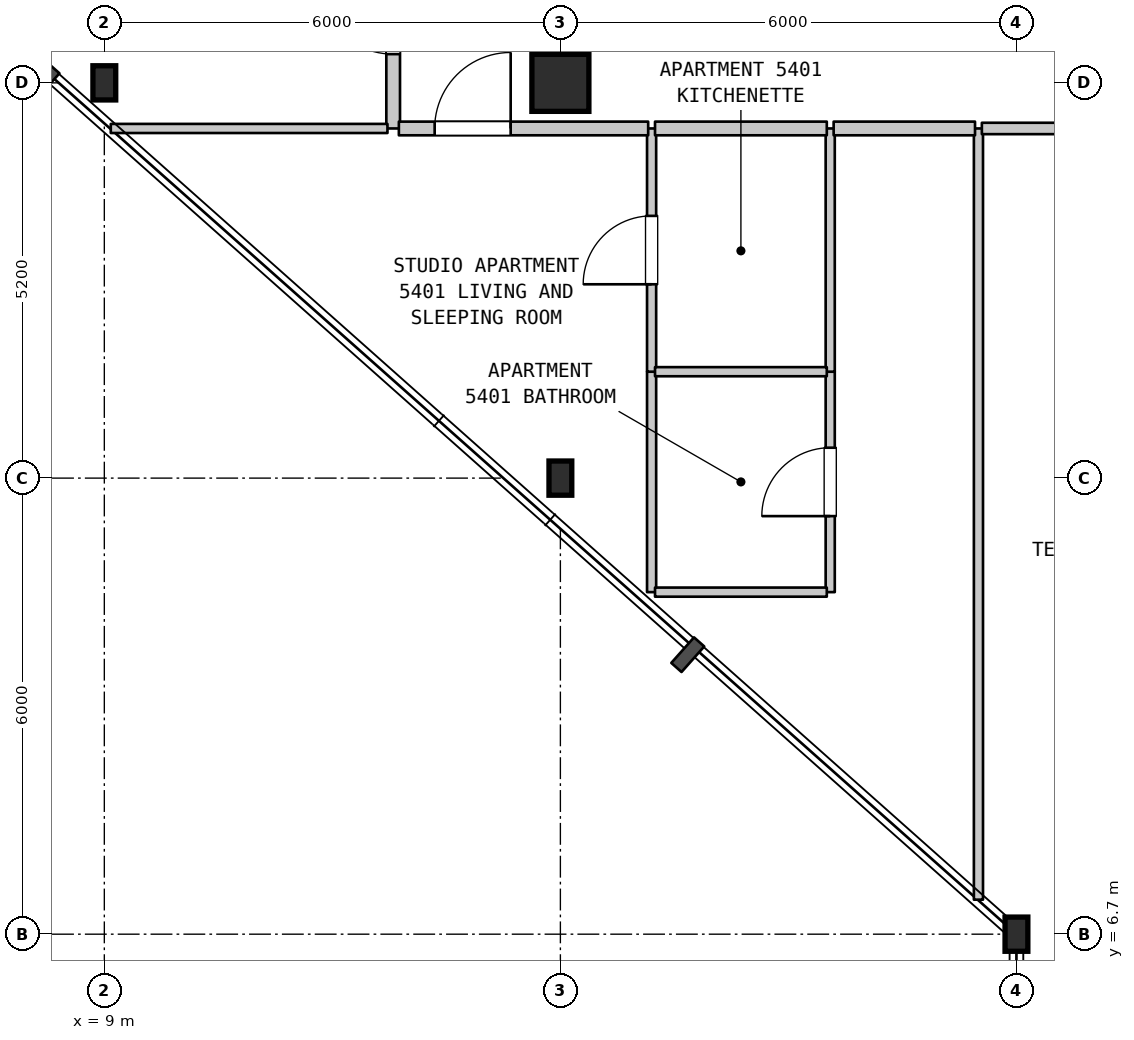
"""IFC4 building model, lengths in metres.
Left out: names, types, materials, properties, quantities, classifications, styles, units other than length and angle.
Written with IfcOpenShell. Run it as: python <this file> out.ifc"""

import sys

from ifc_helpers import new_model, si_unit, direction, frame, frame_2d, origin, origin_2d, place, context, subcontext, project, spatial, rectangle, i_section, extrude, element, fill, save


model = new_model("IFC4")
c1 = context("Model", 3, precision=1e-05, world=origin(), true_north=direction((0.0, 1.0)))
c2 = subcontext(c1, "Body", "Model", "MODEL_VIEW")
j1 = project(units=[si_unit("LENGTHUNIT", "METRE"), si_unit("PLANEANGLEUNIT", "RADIAN")], contexts=[c1])
p1 = place(None, origin())
s1 = spatial("IfcSite", under=j1, at=p1, CompositionType="ELEMENT")
p2 = place(p1, origin())
s2 = spatial("IfcBuilding", under=s1, at=p2, CompositionType="ELEMENT")
p3 = place(p2, frame((0.0, 0.0, 218.0)))
s3 = spatial("IfcBuildingStorey", under=s2, at=p3, CompositionType="ELEMENT", Elevation=218.0)
for number, where, z_axis, x_axis in (
    (1, (9.0, 17.9, 0.0), (0.0, 0.0, 1.0), (1.0, 0.0, 0.0)),
    (2, (15.0, 12.7, 0.0), (0.0, 0.0, 1.0), (1.0, 0.0, 0.0)),
):
    element("IfcColumn", number, at=place(p3, frame(where, z_axis=z_axis, x_axis=x_axis)), inside=s3, PredefinedType="COLUMN", context=c2, shape_type="SweptSolid", body=[
        extrude(i_section(OverallWidth=0.3, OverallDepth=0.45, WebThickness=0.014, FlangeThickness=0.026, FilletRadius=0.027, at=origin_2d()), origin(), (0.0, 0.0, 1.0), 4.8),
    ])
p4 = place(p3, frame((15.0, 17.9, 0.0), z_axis=(0.0, 0.0, 1.0), x_axis=(1.0, 0.0, 0.0)))
e3 = element("IfcColumn", 3, at=p4, inside=s3, PredefinedType="COLUMN", context=c2, shape_type="SweptSolid", body=[
    extrude(rectangle(XDim=0.75, YDim=0.75, at=origin_2d()), origin(), (0.0, 0.0, 1.0), 4.8),
])
p5 = place(p3, frame((21.0, 6.7, 0.0), z_axis=(0.0, 0.0, 1.0), x_axis=(1.0, 0.0, 0.0)))
e4 = element("IfcColumn", 4, at=p5, inside=s3, PredefinedType="COLUMN", context=c2, shape_type="SweptSolid", body=[
    extrude(i_section(OverallWidth=0.3, OverallDepth=0.45, WebThickness=0.014, FlangeThickness=0.026, FilletRadius=0.027, at=origin_2d()), origin(), (0.0, 0.0, 1.0), 4.8),
])
p6 = place(p3, frame((12.8, 17.3, 0.0), z_axis=(0.0, 0.0, 1.0), x_axis=(0.0, 1.0, 0.0)))
e5 = element("IfcWall", 5, at=p6, inside=s3, PredefinedType="STANDARD", context=c2, shape_type="SweptSolid", body=[
    extrude(rectangle(XDim=3.1, YDim=0.18, at=frame_2d((1.55, 0.0))), origin(), (0.0, 0.0, 1.0), 4.49),
])
p7 = place(p6, frame((0.978, 0.0, 0.0)))
e6 = element("IfcOpeningElement", 6, at=p7, cuts=e5, PredefinedType="OPENING", context=c2, shape_type="SweptSolid", body=[
    extrude(rectangle(XDim=1.0, YDim=2.15, at=frame_2d((0.5, 1.075))), frame((0.0, 0.1, 0.0), z_axis=(0.0, -1.0, 0.0), x_axis=(1.0, 0.0, 0.0)), (0.0, 0.0, 1.0), 0.2),
])
p8 = place(p3, frame((16.2, 11.2, 0.0), z_axis=(0.0, 0.0, 1.0), x_axis=(0.0, 1.0, 0.0)))
e7 = element("IfcWall", 7, at=p8, inside=s3, PredefinedType="PARTITIONING", context=c2, shape_type="SweptSolid", body=[
    extrude(rectangle(XDim=2.9, YDim=0.12, at=frame_2d((1.45, 0.0))), origin(), (0.0, 0.0, 1.0), 4.49),
])
p9 = place(p3, frame((16.2, 14.1, 0.0), z_axis=(0.0, 0.0, 1.0), x_axis=(0.0, 1.0, 0.0)))
e8 = element("IfcWall", 8, at=p9, inside=s3, PredefinedType="PARTITIONING", context=c2, shape_type="SweptSolid", body=[
    extrude(rectangle(XDim=3.2, YDim=0.12, at=frame_2d((1.6, 0.0))), origin(), (0.0, 0.0, 1.0), 4.49),
])
p10 = place(p9, frame((1.15, 0.0, 0.0)))
e9 = element("IfcOpeningElement", 9, at=p10, cuts=e8, PredefinedType="OPENING", context=c2, shape_type="SweptSolid", body=[
    extrude(rectangle(XDim=0.9, YDim=2.15, at=frame_2d((0.45, 1.075))), frame((0.0, 0.07, 0.0), z_axis=(0.0, -1.0, 0.0), x_axis=(1.0, 0.0, 0.0)), (0.0, 0.0, 1.0), 0.14),
])
p11 = place(p3, frame((18.55, 11.2, 0.0), z_axis=(0.0, 0.0, 1.0), x_axis=(0.0, 1.0, 0.0)))
e10 = element("IfcWall", 10, at=p11, inside=s3, PredefinedType="PARTITIONING", context=c2, shape_type="SweptSolid", body=[
    extrude(rectangle(XDim=2.9, YDim=0.12, at=frame_2d((1.45, 0.0))), origin(), (0.0, 0.0, 1.0), 4.49),
])
p12 = place(p11, frame((1.0, 0.0, 0.0)))
e11 = element("IfcOpeningElement", 11, at=p12, cuts=e10, PredefinedType="OPENING", context=c2, shape_type="SweptSolid", body=[
    extrude(rectangle(XDim=0.9, YDim=2.1, at=frame_2d((0.45, 1.05))), frame((0.0, 0.07, 0.0), z_axis=(0.0, -1.0, 0.0), x_axis=(1.0, 0.0, 0.0)), (0.0, 0.0, 1.0), 0.14),
])
p13 = place(p3, frame((18.55, 14.1, 0.0), z_axis=(0.0, 0.0, 1.0), x_axis=(0.0, 1.0, 0.0)))
e12 = element("IfcWall", 12, at=p13, inside=s3, PredefinedType="PARTITIONING", context=c2, shape_type="SweptSolid", body=[
    extrude(rectangle(XDim=3.2, YDim=0.12, at=frame_2d((1.6, 0.0))), origin(), (0.0, 0.0, 1.0), 4.49),
])
p14 = place(p3, frame((20.5, 7.154, 0.0), z_axis=(0.0, 0.0, 1.0), x_axis=(0.0, 1.0, 0.0)))
e13 = element("IfcWall", 13, at=p14, inside=s3, PredefinedType="PARTITIONING", context=c2, shape_type="SweptSolid", body=[
    extrude(rectangle(XDim=10.146, YDim=0.12, at=frame_2d((5.073, 0.0))), origin(), (0.0, 0.0, 1.0), 4.49),
])
for number, where, z_axis, x_axis in (
    (14, (16.245, 11.2, 0.0), (0.0, 0.0, 1.0), (1.0, 0.0, 0.0)),
    (15, (16.245, 14.1, 0.0), (0.0, 0.0, 1.0), (1.0, 0.0, 0.0)),
):
    element("IfcWall", number, at=place(p3, frame(where, z_axis=z_axis, x_axis=x_axis)), inside=s3, PredefinedType="PARTITIONING", context=c2, shape_type="SweptSolid", body=[
        extrude(rectangle(XDim=2.26, YDim=0.12, at=frame_2d((1.13, 0.0))), origin(), (0.0, 0.0, 1.0), 4.49),
    ])
p15 = place(p3, frame((9.085, 17.3, 0.0), z_axis=(0.0, 0.0, 1.0), x_axis=(1.0, 0.0, 0.0)))
e16 = element("IfcWall", 16, at=p15, inside=s3, PredefinedType="PARTITIONING", context=c2, shape_type="SweptSolid", body=[
    extrude(rectangle(XDim=3.64, YDim=0.12, at=frame_2d((1.82, 0.0))), origin(), (0.0, 0.0, 1.0), 4.49),
])
p16 = place(p3, frame((12.875, 17.3, 0.0), z_axis=(0.0, 0.0, 1.0), x_axis=(1.0, 0.0, 0.0)))
e17 = element("IfcWall", 17, at=p16, inside=s3, PredefinedType="STANDARD", context=c2, shape_type="SweptSolid", body=[
    extrude(rectangle(XDim=3.28, YDim=0.18, at=frame_2d((1.64, 0.0))), origin(), (0.0, 0.0, 1.0), 4.49),
])
p17 = place(p16, frame((0.471, 0.0, 0.0)))
e18 = element("IfcOpeningElement", 18, at=p17, cuts=e17, PredefinedType="OPENING", context=c2, shape_type="SweptSolid", body=[
    extrude(rectangle(XDim=1.0, YDim=2.15, at=frame_2d((0.5, 1.075))), frame((0.0, 0.1, 0.0), z_axis=(0.0, -1.0, 0.0), x_axis=(1.0, 0.0, 0.0)), (0.0, 0.0, 1.0), 0.2),
])
p18 = place(p3, frame((16.245, 17.3, 0.0), z_axis=(0.0, 0.0, 1.0), x_axis=(1.0, 0.0, 0.0)))
e19 = element("IfcWall", 19, at=p18, inside=s3, PredefinedType="STANDARD", context=c2, shape_type="SweptSolid", body=[
    extrude(rectangle(XDim=2.26, YDim=0.18, at=frame_2d((1.13, 0.0))), origin(), (0.0, 0.0, 1.0), 4.49),
])
p19 = place(p3, frame((18.595, 17.3, 0.0), z_axis=(0.0, 0.0, 1.0), x_axis=(1.0, 0.0, 0.0)))
e20 = element("IfcWall", 20, at=p19, inside=s3, PredefinedType="STANDARD", context=c2, shape_type="SweptSolid", body=[
    extrude(rectangle(XDim=1.86, YDim=0.18, at=frame_2d((0.93, 0.0))), origin(), (0.0, 0.0, 1.0), 4.49),
])
p20 = place(p3, frame((20.545, 17.3, 0.0), z_axis=(0.0, 0.0, 1.0), x_axis=(1.0, 0.0, 0.0)))
e21 = element("IfcWall", 21, at=p20, inside=s3, PredefinedType="STANDARD", context=c2, shape_type="SweptSolid", body=[
    extrude(rectangle(XDim=3.61, YDim=0.15, at=frame_2d((1.805, 0.0))), origin(), (0.0, 0.0, 1.0), 4.49),
])
p21 = place(p20, frame((1.305, 0.0, 0.0)))
e22 = element("IfcOpeningElement", 22, at=p21, cuts=e21, PredefinedType="OPENING", context=c2, shape_type="SweptSolid", body=[
    extrude(rectangle(XDim=1.0, YDim=2.15, at=frame_2d((0.5, 1.075))), frame((0.0, 0.085, 0.0), z_axis=(0.0, -1.0, 0.0), x_axis=(1.0, 0.0, 0.0)), (0.0, 0.0, 1.0), 0.17),
])
p22 = place(p7, origin())
e23 = element("IfcDoor", 23, at=p22, inside=s3, OperationType="SINGLE_SWING_RIGHT", PredefinedType="DOOR", context=c2, shape_type="SweptSolid", body=[
    extrude(rectangle(XDim=1.0, YDim=2.15, at=frame_2d((0.5, 1.075))), frame((0.0, 0.025, 0.0), z_axis=(0.0, -1.0, 0.0), x_axis=(1.0, 0.0, 0.0)), (0.0, 0.0, 1.0), 0.05),
])
fill(e6, e23)
p23 = place(p10, origin())
e24 = element("IfcDoor", 24, at=p23, inside=s3, OperationType="SINGLE_SWING_LEFT", PredefinedType="DOOR", context=c2, shape_type="SweptSolid", body=[
    extrude(rectangle(XDim=0.9, YDim=2.15, at=frame_2d((0.45, 1.075))), frame((0.0, 0.025, 0.0), z_axis=(0.0, -1.0, 0.0), x_axis=(1.0, 0.0, 0.0)), (0.0, 0.0, 1.0), 0.05),
])
fill(e9, e24)
p24 = place(p12, origin())
e25 = element("IfcDoor", 25, at=p24, inside=s3, OperationType="SINGLE_SWING_LEFT", PredefinedType="DOOR", context=c2, shape_type="SweptSolid", body=[
    extrude(rectangle(XDim=0.9, YDim=2.1, at=frame_2d((0.45, 1.05))), frame((0.0, 0.025, 0.0), z_axis=(0.0, -1.0, 0.0), x_axis=(1.0, 0.0, 0.0)), (0.0, 0.0, 1.0), 0.05),
])
fill(e11, e25)
p25 = place(p17, origin())
e26 = element("IfcDoor", 26, at=p25, inside=s3, OperationType="SINGLE_SWING_RIGHT", PredefinedType="DOOR", context=c2, shape_type="SweptSolid", body=[
    extrude(rectangle(XDim=1.0, YDim=2.15, at=frame_2d((0.5, 1.075))), frame((0.0, 0.025, 0.0), z_axis=(0.0, -1.0, 0.0), x_axis=(1.0, 0.0, 0.0)), (0.0, 0.0, 1.0), 0.05),
])
fill(e18, e26)
save(model, sys.argv[1])
